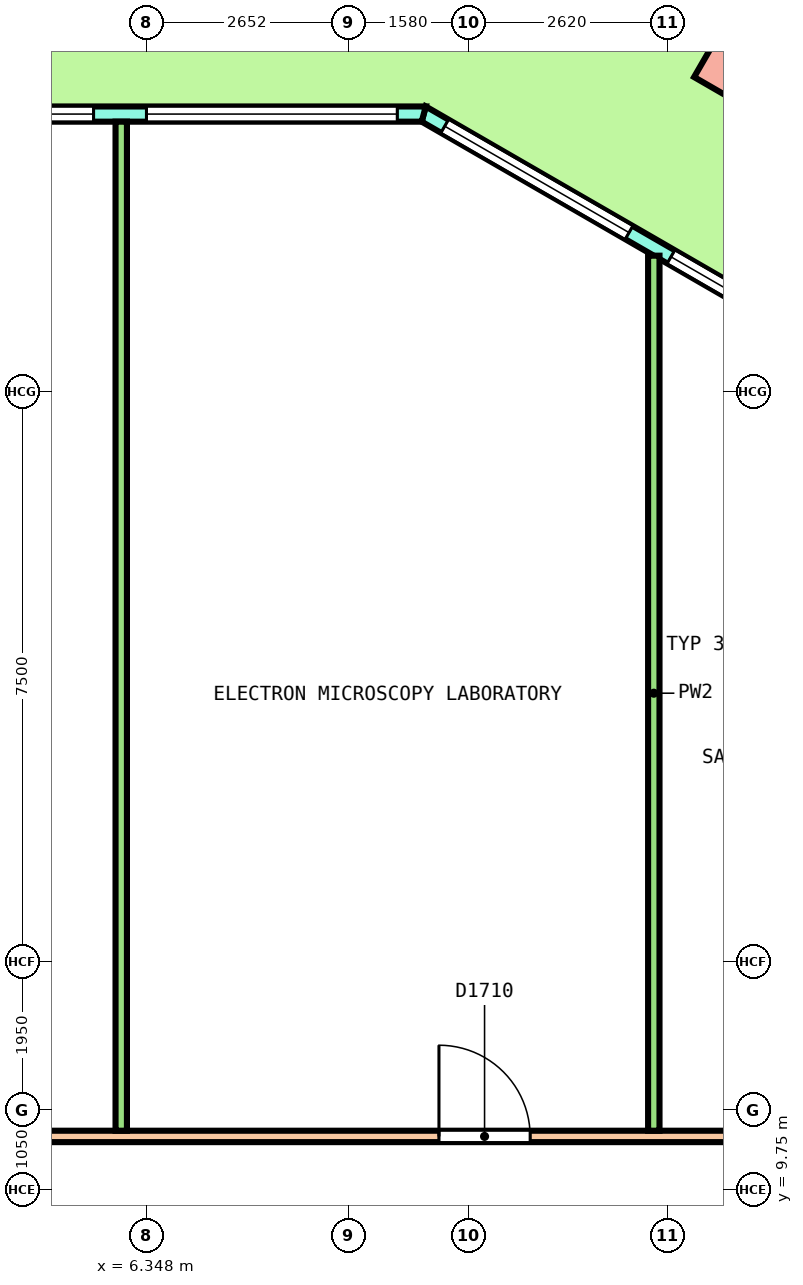
"""IFC4 building model, lengths in metres.
Left out: names, types, materials, properties, quantities, classifications, styles, units other than length and angle.
Written with IfcOpenShell. Run it as: python <this file> out.ifc"""

import sys

from ifc_helpers import new_model, si_unit, direction, frame, frame_2d, origin, origin_2d, place, context, subcontext, project, spatial, polyline, rectangle, outline, extrude, element, fill, save


model = new_model("IFC4")
c1 = context("Model", 3, precision=1e-05, world=origin(), true_north=direction((0.0, 1.0)))
c2 = subcontext(c1, "Body", "Model", "MODEL_VIEW")
j1 = project(units=[si_unit("LENGTHUNIT", "METRE"), si_unit("PLANEANGLEUNIT", "RADIAN")], contexts=[c1])
p1 = place(None, origin())
s1 = spatial("IfcSite", under=j1, at=p1, CompositionType="ELEMENT")
p2 = place(p1, origin())
s2 = spatial("IfcBuilding", under=s1, at=p2, CompositionType="ELEMENT")
p3 = place(p2, frame((0.0, 0.0, 149.6)))
s3 = spatial("IfcBuildingStorey", under=s2, at=p3, CompositionType="ELEMENT", Elevation=149.6)
p4 = place(p3, frame((14.366, 24.606, 0.0), z_axis=(0.036207253783, 0.0, 0.999344302417), x_axis=(-0.865315366935, 0.500246354177, 0.031351250032)))
e1 = element("IfcColumn", 1, at=p4, inside=s3, PredefinedType="COLUMN", context=c2, shape_type="SweptSolid", body=[
    extrude(rectangle(XDim=1.2, YDim=1.2, at=origin_2d()), origin(), (0.0, 0.0, 1.0), 4.052),
])
p5 = place(p3, frame((15.943, 20.463, 0.0), z_axis=(0.0, 0.0, 1.0), x_axis=(-0.866029458321, 0.49999297727, 0.0)))
e2 = element("IfcWall", 2, at=p5, inside=s3, PredefinedType="SOLIDWALL", context=c2, shape_type="SweptSolid", body=[
    extrude(outline(polyline([(-0.027, -0.1), (1.128, -0.1), (2.282, -0.1), (3.437, -0.1), (4.592, -0.1), (5.747, -0.1), (6.901, -0.1), (6.848, 0.1), (5.711, 0.1), (4.574, 0.1), (3.437, 0.1), (2.301, 0.1), (1.164, 0.1), (0.027, 0.1), (-0.027, -0.1)])), origin(), (0.0, 0.0, 1.0), 4.1),
])
p6 = place(p5, frame((0.319, 0.0, 0.1)))
e3 = element("IfcOpeningElement", 3, at=p6, cuts=e2, PredefinedType="OPENING", context=c2, shape_type="SweptSolid", body=[
    extrude(rectangle(XDim=2.8, YDim=2.9, at=frame_2d((1.4, 1.45))), frame((0.0, 0.11, 0.0), z_axis=(0.0, -1.0, 0.0), x_axis=(1.0, 0.0, 0.0)), (0.0, 0.0, 1.0), 0.22),
])
p7 = place(p5, frame((3.756, 0.0, 0.1)))
e4 = element("IfcOpeningElement", 4, at=p7, cuts=e2, PredefinedType="OPENING", context=c2, shape_type="SweptSolid", body=[
    extrude(rectangle(XDim=2.8, YDim=2.9, at=frame_2d((1.4, 1.45))), frame((0.0, 0.11, 0.0), z_axis=(0.0, -1.0, 0.0), x_axis=(1.0, 0.0, 0.0)), (0.0, 0.0, 1.0), 0.22),
])
p8 = place(p3, frame((9.989, 23.9, 0.0), z_axis=(0.0, 0.0, 1.0), x_axis=(-1.0, 0.0, 0.0)))
e5 = element("IfcWall", 5, at=p8, inside=s3, PredefinedType="SOLIDWALL", context=c2, shape_type="SweptSolid", body=[
    extrude(outline(polyline([(-0.027, -0.1), (1.028, -0.1), (2.082, -0.1), (3.136, -0.1), (4.19, -0.1), (5.245, -0.1), (6.299, -0.1), (7.354, -0.1), (8.408, -0.1), (9.462, -0.1), (10.516, -0.1), (11.571, -0.1), (12.625, -0.1), (13.679, -0.1), (14.734, -0.1), (15.788, -0.1), (16.842, -0.1), (17.897, -0.1), (18.951, -0.1), (20.005, -0.1), (19.952, 0.1), (18.903, 0.1), (17.854, 0.1), (16.806, 0.1), (15.757, 0.1), (14.708, 0.1), (13.66, 0.1), (12.611, 0.1), (11.562, 0.1), (10.514, 0.1), (9.465, 0.1), (8.416, 0.1), (7.368, 0.1), (6.319, 0.1), (5.27, 0.1), (4.221, 0.1), (3.173, 0.1), (2.124, 0.1), (1.075, 0.1), (0.027, 0.1), (-0.027, -0.1)])), origin(), (0.0, 0.0, 1.0), 4.1),
])
p9 = place(p8, frame((0.348, 0.0, 0.1)))
e6 = element("IfcOpeningElement", 6, at=p9, cuts=e5, PredefinedType="OPENING", context=c2, shape_type="SweptSolid", body=[
    extrude(rectangle(XDim=3.3, YDim=2.9, at=frame_2d((1.65, 1.45))), frame((0.0, 0.11, 0.0), z_axis=(0.0, -1.0, 0.0), x_axis=(1.0, 0.0, 0.0)), (0.0, 0.0, 1.0), 0.22),
])
p10 = place(p8, frame((4.344, 0.0, 0.1)))
e7 = element("IfcOpeningElement", 7, at=p10, cuts=e5, PredefinedType="OPENING", context=c2, shape_type="SweptSolid", body=[
    extrude(rectangle(XDim=3.3, YDim=2.9, at=frame_2d((1.65, 1.45))), frame((0.0, 0.11, 0.0), z_axis=(0.0, -1.0, 0.0), x_axis=(1.0, 0.0, 0.0)), (0.0, 0.0, 1.0), 0.22),
])
p11 = place(p8, frame((9.089, 0.0, 0.0)))
e8 = element("IfcOpeningElement", 8, at=p11, cuts=e5, PredefinedType="OPENING", context=c2, shape_type="SweptSolid", body=[
    extrude(rectangle(XDim=1.8, YDim=2.4, at=frame_2d((0.9, 1.2))), frame((0.0, 0.11, 0.0), z_axis=(0.0, -1.0, 0.0), x_axis=(1.0, 0.0, 0.0)), (0.0, 0.0, 1.0), 0.22),
])
p12 = place(p8, frame((9.089, 0.0, 2.55)))
e9 = element("IfcOpeningElement", 9, at=p12, cuts=e5, PredefinedType="OPENING", context=c2, shape_type="SweptSolid", body=[
    extrude(rectangle(XDim=1.8, YDim=0.45, at=frame_2d((0.9, 0.225))), frame((0.0, 0.11, 0.0), z_axis=(0.0, -1.0, 0.0), x_axis=(1.0, 0.0, 0.0)), (0.0, 0.0, 1.0), 0.22),
])
p13 = place(p8, frame((12.335, 0.0, 0.1)))
e10 = element("IfcOpeningElement", 10, at=p13, cuts=e5, PredefinedType="OPENING", context=c2, shape_type="SweptSolid", body=[
    extrude(rectangle(XDim=3.3, YDim=2.9, at=frame_2d((1.65, 1.45))), frame((0.0, 0.11, 0.0), z_axis=(0.0, -1.0, 0.0), x_axis=(1.0, 0.0, 0.0)), (0.0, 0.0, 1.0), 0.22),
])
p14 = place(p8, frame((16.331, 0.0, 0.1)))
e11 = element("IfcOpeningElement", 11, at=p14, cuts=e5, PredefinedType="OPENING", context=c2, shape_type="SweptSolid", body=[
    extrude(rectangle(XDim=3.3, YDim=2.9, at=frame_2d((1.65, 1.45))), frame((0.0, 0.11, 0.0), z_axis=(0.0, -1.0, 0.0), x_axis=(1.0, 0.0, 0.0)), (0.0, 0.0, 1.0), 0.22),
])
p15 = place(p3, frame((-15.475, 10.45, 0.0), z_axis=(0.0, 0.0, 1.0), x_axis=(1.0, 0.0, 0.0)))
e12 = element("IfcWall", 12, at=p15, inside=s3, PredefinedType="PARTITIONING", context=c2, shape_type="SweptSolid", body=[
    extrude(rectangle(XDim=31.1, YDim=0.15, at=frame_2d((15.55, 0.0))), origin(), (0.0, 0.0, 1.0), 3.05),
])
p16 = place(p15, frame((25.665, 0.0, 0.0)))
e13 = element("IfcOpeningElement", 13, at=p16, cuts=e12, PredefinedType="OPENING", context=c2, shape_type="SweptSolid", body=[
    extrude(rectangle(XDim=1.2, YDim=2.1, at=frame_2d((0.6, 1.05))), frame((0.0, 0.085, 0.0), z_axis=(0.0, -1.0, 0.0), x_axis=(1.0, 0.0, 0.0)), (0.0, 0.0, 1.0), 0.17),
])
p17 = place(p15, frame((14.99, 0.0, 0.0)))
e14 = element("IfcOpeningElement", 14, at=p17, cuts=e12, PredefinedType="OPENING", context=c2, shape_type="SweptSolid", body=[
    extrude(rectangle(XDim=1.2, YDim=2.1, at=frame_2d((0.6, 1.05))), frame((0.0, 0.085, 0.0), z_axis=(0.0, -1.0, 0.0), x_axis=(1.0, 0.0, 0.0)), (0.0, 0.0, 1.0), 0.17),
])
p18 = place(p15, frame((2.637, 0.0, 0.0)))
e15 = element("IfcOpeningElement", 15, at=p18, cuts=e12, PredefinedType="OPENING", context=c2, shape_type="SweptSolid", body=[
    extrude(rectangle(XDim=1.2, YDim=2.1, at=frame_2d((0.6, 1.05))), frame((0.0, 0.085, 0.0), z_axis=(0.0, -1.0, 0.0), x_axis=(1.0, 0.0, 0.0)), (0.0, 0.0, 1.0), 0.17),
])
p19 = place(p3, frame((13.016, 10.525, 0.0), z_axis=(0.0, 0.0, 1.0), x_axis=(0.0, 1.0, 0.0)))
e16 = element("IfcWall", 16, at=p19, inside=s3, PredefinedType="PARTITIONING", context=c2, shape_type="SweptSolid", body=[
    extrude(rectangle(XDim=11.512, YDim=0.15, at=frame_2d((5.756, 0.0))), origin(), (0.0, 0.0, 1.0), 3.05),
])
p20 = place(p3, frame((6.01, 10.525, 0.0), z_axis=(0.0, 0.0, 1.0), x_axis=(0.0, 1.0, 0.0)))
e17 = element("IfcWall", 17, at=p20, inside=s3, PredefinedType="PARTITIONING", context=c2, shape_type="SweptSolid", body=[
    extrude(rectangle(XDim=13.275, YDim=0.15, at=frame_2d((6.638, 0.0))), origin(), (0.0, 0.0, 1.0), 3.05),
])
p21 = place(p6, origin())
e18 = element("IfcWindow", 18, at=p21, inside=s3, PartitioningType="SINGLE_PANEL", PredefinedType="WINDOW", context=c2, shape_type="SweptSolid", body=[
    extrude(rectangle(XDim=2.8, YDim=2.9, at=frame_2d((1.4, 1.45))), frame((0.0, 0.03, 0.0), z_axis=(0.0, -1.0, 0.0), x_axis=(1.0, 0.0, 0.0)), (0.0, 0.0, 1.0), 0.06),
])
fill(e3, e18)
p22 = place(p7, origin())
e19 = element("IfcWindow", 19, at=p22, inside=s3, PartitioningType="SINGLE_PANEL", PredefinedType="WINDOW", context=c2, shape_type="SweptSolid", body=[
    extrude(rectangle(XDim=2.8, YDim=2.9, at=frame_2d((1.4, 1.45))), frame((0.0, 0.03, 0.0), z_axis=(0.0, -1.0, 0.0), x_axis=(1.0, 0.0, 0.0)), (0.0, 0.0, 1.0), 0.06),
])
fill(e4, e19)
p23 = place(p9, origin())
e20 = element("IfcWindow", 20, at=p23, inside=s3, PartitioningType="SINGLE_PANEL", PredefinedType="WINDOW", context=c2, shape_type="SweptSolid", body=[
    extrude(rectangle(XDim=3.3, YDim=2.9, at=frame_2d((1.65, 1.45))), frame((0.0, 0.03, 0.0), z_axis=(0.0, -1.0, 0.0), x_axis=(1.0, 0.0, 0.0)), (0.0, 0.0, 1.0), 0.06),
])
fill(e6, e20)
p24 = place(p10, origin())
e21 = element("IfcWindow", 21, at=p24, inside=s3, PartitioningType="SINGLE_PANEL", PredefinedType="WINDOW", context=c2, shape_type="SweptSolid", body=[
    extrude(rectangle(XDim=3.3, YDim=2.9, at=frame_2d((1.65, 1.45))), frame((0.0, 0.03, 0.0), z_axis=(0.0, -1.0, 0.0), x_axis=(1.0, 0.0, 0.0)), (0.0, 0.0, 1.0), 0.06),
])
fill(e7, e21)
p25 = place(p16, origin())
e22 = element("IfcDoor", 22, at=p25, inside=s3, OperationType="DOUBLE_DOOR_SINGLE_SWING", PredefinedType="DOOR", context=c2, shape_type="SweptSolid", body=[
    extrude(rectangle(XDim=1.2, YDim=2.1, at=frame_2d((0.6, 1.05))), frame((0.0, 0.025, 0.0), z_axis=(0.0, -1.0, 0.0), x_axis=(1.0, 0.0, 0.0)), (0.0, 0.0, 1.0), 0.05),
])
fill(e13, e22)
save(model, sys.argv[1])
